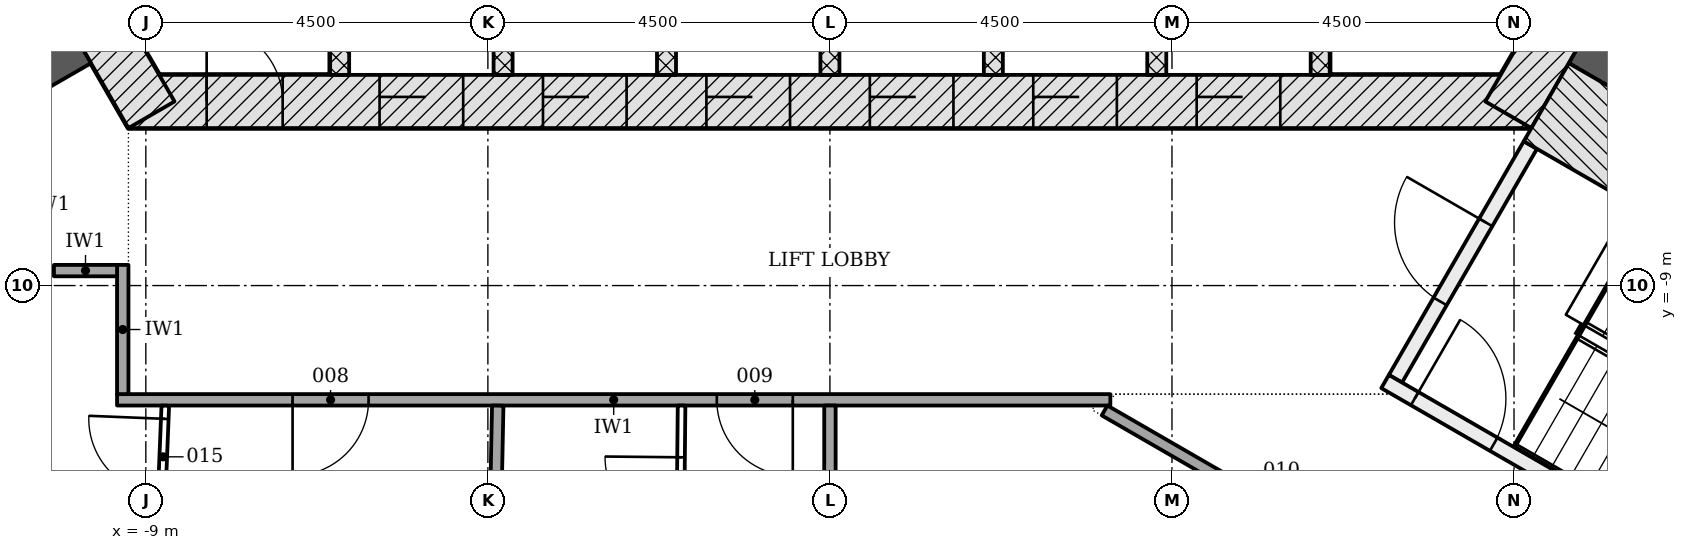
"""IFC4 building model, lengths in metres.
Left out: names, types, materials, properties, quantities, classifications, styles, units other than length and angle.
Written with IfcOpenShell. Run it as: python <this file> out.ifc"""

import sys

from ifc_helpers import new_model, si_unit, direction, frame, frame_2d, origin, place, context, subcontext, project, spatial, rectangle, extrude, element, fill, save


model = new_model("IFC4")
c1 = context("Model", 3, precision=1e-05, world=origin(), true_north=direction((0.0, 1.0)))
c2 = subcontext(c1, "Body", "Model", "MODEL_VIEW")
j1 = project(units=[si_unit("LENGTHUNIT", "METRE"), si_unit("PLANEANGLEUNIT", "RADIAN")], contexts=[c1])
p1 = place(None, origin())
s1 = spatial("IfcSite", under=j1, at=p1, CompositionType="ELEMENT")
p2 = place(p1, origin())
s2 = spatial("IfcBuilding", under=s1, at=p2, CompositionType="ELEMENT")
p3 = place(p2, frame((0.0, 0.0, 109.5)))
s3 = spatial("IfcBuildingStorey", under=s2, at=p3, CompositionType="ELEMENT", Elevation=109.5)
p4 = place(p3, frame((-9.229, -6.578, -0.2), z_axis=(0.0, 0.0, 1.0), x_axis=(1.0, 0.0, 0.0)))
e1 = element("IfcWall", 1, at=p4, inside=s3, PredefinedType="SHEAR", context=c2, shape_type="SweptSolid", body=[
    extrude(rectangle(XDim=18.458, YDim=0.7, at=frame_2d((9.229, 0.0))), origin(), (0.0, 0.0, 1.0), 3.6),
])
p5 = place(p4, frame((3.304, 0.0, 0.2)))
e2 = element("IfcOpeningElement", 2, at=p5, cuts=e1, PredefinedType="OPENING", context=c2, shape_type="SweptSolid", body=[
    extrude(rectangle(XDim=1.1, YDim=2.1, at=frame_2d((0.55, 1.05))), frame((0.0, 0.36, 0.0), z_axis=(0.0, -1.0, 0.0), x_axis=(1.0, 0.0, 0.0)), (0.0, 0.0, 1.0), 0.72),
])
p6 = place(p4, frame((5.454, 0.0, 0.2)))
e3 = element("IfcOpeningElement", 3, at=p6, cuts=e1, PredefinedType="OPENING", context=c2, shape_type="SweptSolid", body=[
    extrude(rectangle(XDim=1.1, YDim=2.1, at=frame_2d((0.55, 1.05))), frame((0.0, 0.36, 0.0), z_axis=(0.0, -1.0, 0.0), x_axis=(1.0, 0.0, 0.0)), (0.0, 0.0, 1.0), 0.72),
])
p7 = place(p4, frame((7.604, 0.0, 0.2)))
e4 = element("IfcOpeningElement", 4, at=p7, cuts=e1, PredefinedType="OPENING", context=c2, shape_type="SweptSolid", body=[
    extrude(rectangle(XDim=1.1, YDim=2.1, at=frame_2d((0.55, 1.05))), frame((0.0, 0.36, 0.0), z_axis=(0.0, -1.0, 0.0), x_axis=(1.0, 0.0, 0.0)), (0.0, 0.0, 1.0), 0.72),
])
p8 = place(p4, frame((9.754, 0.0, 0.2)))
e5 = element("IfcOpeningElement", 5, at=p8, cuts=e1, PredefinedType="OPENING", context=c2, shape_type="SweptSolid", body=[
    extrude(rectangle(XDim=1.1, YDim=2.1, at=frame_2d((0.55, 1.05))), frame((0.0, 0.36, 0.0), z_axis=(0.0, -1.0, 0.0), x_axis=(1.0, 0.0, 0.0)), (0.0, 0.0, 1.0), 0.72),
])
p9 = place(p4, frame((11.904, 0.0, 0.2)))
e6 = element("IfcOpeningElement", 6, at=p9, cuts=e1, PredefinedType="OPENING", context=c2, shape_type="SweptSolid", body=[
    extrude(rectangle(XDim=1.1, YDim=2.1, at=frame_2d((0.55, 1.05))), frame((0.0, 0.36, 0.0), z_axis=(0.0, -1.0, 0.0), x_axis=(1.0, 0.0, 0.0)), (0.0, 0.0, 1.0), 0.72),
])
p10 = place(p4, frame((14.054, 0.0, 0.2)))
e7 = element("IfcOpeningElement", 7, at=p10, cuts=e1, PredefinedType="OPENING", context=c2, shape_type="SweptSolid", body=[
    extrude(rectangle(XDim=1.1, YDim=2.1, at=frame_2d((0.55, 1.05))), frame((0.0, 0.36, 0.0), z_axis=(0.0, -1.0, 0.0), x_axis=(1.0, 0.0, 0.0)), (0.0, 0.0, 1.0), 0.72),
])
p11 = place(p4, frame((1.029, 0.0, 0.2)))
e8 = element("IfcOpeningElement", 8, at=p11, cuts=e1, PredefinedType="OPENING", context=c2, shape_type="SweptSolid", body=[
    extrude(rectangle(XDim=1.0, YDim=2.1, at=frame_2d((0.5, 1.05))), frame((0.0, 0.36, 0.0), z_axis=(0.0, -1.0, 0.0), x_axis=(1.0, 0.0, 0.0)), (0.0, 0.0, 1.0), 0.72),
])
for number, where, z_axis, x_axis in (
    (9, (8.926, -6.753, -0.2), (0.0, 0.0, 1.0), (0.5, 0.866, 0.0)),
    (10, (-10.311, -4.353, -0.2), (0.0, 0.0, 1.0), (0.5, -0.866, 0.0)),
):
    element("IfcWall", number, at=place(p3, frame(where, z_axis=z_axis, x_axis=x_axis)), inside=s3, PredefinedType="SHEAR", context=c2, shape_type="SweptSolid", body=[
        extrude(rectangle(XDim=2.771, YDim=0.7, at=frame_2d((1.386, 0.0))), origin(), (0.0, 0.0, 1.0), 3.6),
    ])
for number, where, z_axis, x_axis in (
    (11, (-9.922, -5.728, -0.2), (0.0, 0.0, 1.0), (-0.866, -0.5, 0.0)),
    (12, (9.922, -5.728, -0.2), (0.0, 0.0, 1.0), (0.866, -0.5, 0.0)),
):
    element("IfcWall", number, at=place(p3, frame(where, z_axis=z_axis, x_axis=x_axis)), inside=s3, PredefinedType="SHEAR", context=c2, shape_type="SweptSolid", body=[
        extrude(rectangle(XDim=11.918, YDim=0.8, at=frame_2d((5.959, 0.0))), origin(), (0.0, 0.0, 1.0), 3.6),
    ])
for number, where, z_axis, x_axis in (
    (13, (-6.45, -6.228, -0.2), (0.0, 0.0, 1.0), (0.0, 1.0, 0.0)),
    (14, (-4.3, -6.228, -0.2), (0.0, 0.0, 1.0), (0.0, 1.0, 0.0)),
    (15, (-2.15, -6.228, -0.2), (0.0, 0.0, 1.0), (0.0, 1.0, 0.0)),
    (16, (0.0, -6.228, -0.2), (0.0, 0.0, 1.0), (0.0, 1.0, 0.0)),
    (17, (2.15, -6.228, -0.2), (0.0, 0.0, 1.0), (0.0, 1.0, 0.0)),
    (18, (4.3, -6.228, -0.2), (0.0, 0.0, 1.0), (0.0, 1.0, 0.0)),
    (19, (6.45, -6.228, -0.2), (0.0, 0.0, 1.0), (0.0, 1.0, 0.0)),
):
    element("IfcWall", number, at=place(p3, frame(where, z_axis=z_axis, x_axis=x_axis)), inside=s3, PredefinedType="PARTITIONING", context=c2, shape_type="SweptSolid", body=[
        extrude(rectangle(XDim=2.5, YDim=0.25, at=frame_2d((1.25, 0.0))), origin(), (0.0, 0.0, 1.0), 3.6),
    ])
p12 = place(p3, frame((-10.418, -4.868, -0.2), z_axis=(0.0, 0.0, 1.0), x_axis=(-0.866018442252, -0.500012057535, 0.0)))
e20 = element("IfcWall", 20, at=p12, inside=s3, PredefinedType="SHEAR", context=c2, shape_type="SweptSolid", body=[
    extrude(rectangle(XDim=7.2, YDim=1.186, at=frame_2d((3.6, 0.0))), origin(), (0.0, 0.0, 1.0), 3.6),
])
p13 = place(p3, frame((7.44, -10.226, -0.2), z_axis=(0.0, 0.0, 1.0), x_axis=(0.500022077904, 0.866012656725, 0.0)))
e21 = element("IfcWall", 21, at=p13, inside=s3, PredefinedType="SHEAR", context=c2, shape_type="SweptSolid", body=[
    extrude(rectangle(XDim=3.55, YDim=0.2, at=frame_2d((1.775, 0.0))), origin(), (0.0, 0.0, 1.0), 3.6),
])
p14 = place(p13, frame((1.175, 0.0, 0.2)))
e22 = element("IfcOpeningElement", 22, at=p14, cuts=e21, PredefinedType="OPENING", context=c2, shape_type="SweptSolid", body=[
    extrude(rectangle(XDim=1.2, YDim=2.1, at=frame_2d((0.6, 1.05))), frame((0.0, 0.11, 0.0), z_axis=(0.0, -1.0, 0.0), x_axis=(1.0, 0.0, 0.0)), (0.0, 0.0, 1.0), 0.22),
])
p15 = place(p3, frame((7.304, -10.262, -0.2), z_axis=(0.0, 0.0, 1.0), x_axis=(0.866026594901, -0.49999793692, 0.0)))
e23 = element("IfcWall", 23, at=p15, inside=s3, PredefinedType="SHEAR", context=c2, shape_type="SweptSolid", body=[
    extrude(rectangle(XDim=5.6, YDim=0.2, at=frame_2d((2.8, 0.0))), origin(), (0.0, 0.0, 1.0), 3.6),
])
p16 = place(p15, frame((0.45, 0.0, 0.2)))
e24 = element("IfcOpeningElement", 24, at=p16, cuts=e23, PredefinedType="OPENING", context=c2, shape_type="SweptSolid", body=[
    extrude(rectangle(XDim=1.2, YDim=2.1, at=frame_2d((0.6, 1.05))), frame((0.0, 0.11, 0.0), z_axis=(0.0, -1.0, 0.0), x_axis=(1.0, 0.0, 0.0)), (0.0, 0.0, 1.0), 0.22),
])
p17 = place(p3, frame((9.425, -6.588, -0.2), z_axis=(0.0, 0.0, 1.0), x_axis=(0.866018442252, -0.500012057535, 0.0)))
e25 = element("IfcWall", 25, at=p17, inside=s3, PredefinedType="SHEAR", context=c2, shape_type="SweptSolid", body=[
    extrude(rectangle(XDim=7.2, YDim=1.186, at=frame_2d((3.6, 0.0))), origin(), (0.0, 0.0, 1.0), 3.6),
])
p18 = place(p3, frame((3.689, -10.503, 0.0), z_axis=(0.0, 0.0, 1.0), x_axis=(-1.0, 0.0, 0.0)))
e26 = element("IfcWall", 26, at=p18, inside=s3, PredefinedType="PARTITIONING", context=c2, shape_type="SweptSolid", body=[
    extrude(rectangle(XDim=13.068, YDim=0.15, at=frame_2d((6.534, 0.0))), origin(), (0.0, 0.0, 1.0), 2.847),
])
p19 = place(p18, frame((9.758, 0.0, 0.0)))
e27 = element("IfcOpeningElement", 27, at=p19, cuts=e26, PredefinedType="OPENING", context=c2, shape_type="SweptSolid", body=[
    extrude(rectangle(XDim=1.0, YDim=2.1, at=frame_2d((0.5, 1.05))), frame((0.0, 0.085, 0.0), z_axis=(0.0, -1.0, 0.0), x_axis=(1.0, 0.0, 0.0)), (0.0, 0.0, 1.0), 0.17),
])
p20 = place(p18, frame((4.177, 0.0, 0.0)))
e28 = element("IfcOpeningElement", 28, at=p20, cuts=e26, PredefinedType="OPENING", context=c2, shape_type="SweptSolid", body=[
    extrude(rectangle(XDim=1.0, YDim=2.1, at=frame_2d((0.5, 1.05))), frame((0.0, 0.085, 0.0), z_axis=(0.0, -1.0, 0.0), x_axis=(1.0, 0.0, 0.0)), (0.0, 0.0, 1.0), 0.17),
])
p21 = place(p3, frame((8.641, -13.546, 0.0), z_axis=(0.0, 0.0, 1.0), x_axis=(-0.866042728627, 0.499969991291, 0.0)))
e29 = element("IfcWall", 29, at=p21, inside=s3, PredefinedType="PARTITIONING", context=c2, shape_type="SweptSolid", body=[
    extrude(rectangle(XDim=5.805, YDim=0.15, at=frame_2d((2.903, 0.0))), origin(), (0.0, 0.0, 1.0), 2.847),
])
p22 = place(p21, frame((2.616, 0.0, 0.0)))
e30 = element("IfcOpeningElement", 30, at=p22, cuts=e29, PredefinedType="OPENING", context=c2, shape_type="SweptSolid", body=[
    extrude(rectangle(XDim=1.0, YDim=2.1, at=frame_2d((0.5, 1.05))), frame((0.0, 0.085, 0.0), z_axis=(0.0, -1.0, 0.0), x_axis=(1.0, 0.0, 0.0)), (0.0, 0.0, 1.0), 0.17),
])
p23 = place(p3, frame((-11.345, -7.012, 0.0), z_axis=(0.0, 0.0, 1.0), x_axis=(0.499998569178, -0.866026229868, 0.0)))
e31 = element("IfcWall", 31, at=p23, inside=s3, PredefinedType="PARTITIONING", context=c2, shape_type="SweptSolid", body=[
    extrude(rectangle(XDim=2.143, YDim=0.15, at=frame_2d((1.072, 0.0))), origin(), (0.0, 0.0, 1.0), 3.4),
])
p24 = place(p3, frame((-9.304, -10.428, 0.0), z_axis=(0.0, 0.0, 1.0), x_axis=(0.0, 1.0, 0.0)))
e32 = element("IfcWall", 32, at=p24, inside=s3, PredefinedType="PARTITIONING", context=c2, shape_type="SweptSolid", body=[
    extrude(rectangle(XDim=1.7, YDim=0.15, at=frame_2d((0.85, 0.0))), origin(), (0.0, 0.0, 1.0), 3.4),
])
p25 = place(p3, frame((-10.209, -8.803, 0.0), z_axis=(0.0, 0.0, 1.0), x_axis=(1.0, 0.0, 0.0)))
e33 = element("IfcWall", 33, at=p25, inside=s3, PredefinedType="PARTITIONING", context=c2, shape_type="SweptSolid", body=[
    extrude(rectangle(XDim=0.83, YDim=0.15, at=frame_2d((0.415, 0.0))), origin(), (0.0, 0.0, 1.0), 3.4),
])
p26 = place(p3, frame((0.0, -16.274, 0.0), z_axis=(0.0, 0.0, 1.0), x_axis=(0.0, 1.0, 0.0)))
e34 = element("IfcWall", 34, at=p26, inside=s3, PredefinedType="PARTITIONING", context=c2, shape_type="SweptSolid", body=[
    extrude(rectangle(XDim=5.696, YDim=0.15, at=frame_2d((2.848, 0.0))), origin(), (0.0, 0.0, 1.0), 2.847),
])
p27 = place(p3, frame((-4.484, -16.229, 0.0), z_axis=(0.0, 0.0, 1.0), x_axis=(0.020089281754, 0.999798190016, 0.0)))
e35 = element("IfcWall", 35, at=p27, inside=s3, PredefinedType="PARTITIONING", context=c2, shape_type="SweptSolid", body=[
    extrude(rectangle(XDim=5.651, YDim=0.15, at=frame_2d((2.826, 0.0))), origin(), (0.0, 0.0, 1.0), 2.847),
])
p28 = place(p3, frame((-8.966, -16.094, 0.0), z_axis=(0.0, 0.0, 1.0), x_axis=(0.040167671745, 0.999192953411, 0.0)))
e36 = element("IfcWall", 36, at=p28, inside=s3, PredefinedType="PARTITIONING", context=c2, shape_type="SweptSolid", body=[
    extrude(rectangle(XDim=5.519, YDim=0.1, at=frame_2d((2.759, 0.0))), origin(), (0.0, 0.0, 1.0), 2.847),
])
p29 = place(p28, frame((4.345, 0.0, 0.0)))
e37 = element("IfcOpeningElement", 37, at=p29, cuts=e36, PredefinedType="OPENING", context=c2, shape_type="SweptSolid", body=[
    extrude(rectangle(XDim=1.0, YDim=2.1, at=frame_2d((0.5, 1.05))), frame((0.0, 0.06, 0.0), z_axis=(0.0, -1.0, 0.0), x_axis=(1.0, 0.0, 0.0)), (0.0, 0.0, 1.0), 0.12),
])
p30 = place(p28, frame((1.634, 0.0, 0.0)))
e38 = element("IfcOpeningElement", 38, at=p30, cuts=e36, PredefinedType="OPENING", context=c2, shape_type="SweptSolid", body=[
    extrude(rectangle(XDim=1.0, YDim=2.1, at=frame_2d((0.5, 1.05))), frame((0.0, 0.06, 0.0), z_axis=(0.0, -1.0, 0.0), x_axis=(1.0, 0.0, 0.0)), (0.0, 0.0, 1.0), 0.12),
])
p31 = place(p3, frame((-1.976, -12.959, 0.0), z_axis=(0.0, 0.0, 1.0), x_axis=(0.009947205513, 0.999950525327, 0.0)))
e39 = element("IfcWall", 39, at=p31, inside=s3, PredefinedType="PARTITIONING", context=c2, shape_type="SweptSolid", body=[
    extrude(rectangle(XDim=2.381, YDim=0.1, at=frame_2d((1.19, 0.0))), origin(), (0.0, 0.0, 1.0), 3.4),
])
p32 = place(p31, frame((0.7, 0.0, 0.0)))
e40 = element("IfcOpeningElement", 40, at=p32, cuts=e39, PredefinedType="OPENING", context=c2, shape_type="SweptSolid", body=[
    extrude(rectangle(XDim=1.0, YDim=2.1, at=frame_2d((0.5, 1.05))), frame((0.0, 0.06, 0.0), z_axis=(0.0, -1.0, 0.0), x_axis=(1.0, 0.0, 0.0)), (0.0, 0.0, 1.0), 0.12),
])
p33 = place(p5, origin())
e41 = element("IfcDoor", 41, at=p33, inside=s3, OperationType="DOUBLE_DOOR_SLIDING", PredefinedType="DOOR", context=c2, shape_type="SweptSolid", body=[
    extrude(rectangle(XDim=1.1, YDim=2.1, at=frame_2d((0.55, 1.05))), frame((0.0, 0.025, 0.0), z_axis=(0.0, -1.0, 0.0), x_axis=(1.0, 0.0, 0.0)), (0.0, 0.0, 1.0), 0.05),
])
fill(e2, e41)
p34 = place(p6, origin())
e42 = element("IfcDoor", 42, at=p34, inside=s3, OperationType="DOUBLE_DOOR_SLIDING", PredefinedType="DOOR", context=c2, shape_type="SweptSolid", body=[
    extrude(rectangle(XDim=1.1, YDim=2.1, at=frame_2d((0.55, 1.05))), frame((0.0, 0.025, 0.0), z_axis=(0.0, -1.0, 0.0), x_axis=(1.0, 0.0, 0.0)), (0.0, 0.0, 1.0), 0.05),
])
fill(e3, e42)
p35 = place(p7, origin())
e43 = element("IfcDoor", 43, at=p35, inside=s3, OperationType="DOUBLE_DOOR_SLIDING", PredefinedType="DOOR", context=c2, shape_type="SweptSolid", body=[
    extrude(rectangle(XDim=1.1, YDim=2.1, at=frame_2d((0.55, 1.05))), frame((0.0, 0.025, 0.0), z_axis=(0.0, -1.0, 0.0), x_axis=(1.0, 0.0, 0.0)), (0.0, 0.0, 1.0), 0.05),
])
fill(e4, e43)
p36 = place(p8, origin())
e44 = element("IfcDoor", 44, at=p36, inside=s3, OperationType="DOUBLE_DOOR_SLIDING", PredefinedType="DOOR", context=c2, shape_type="SweptSolid", body=[
    extrude(rectangle(XDim=1.1, YDim=2.1, at=frame_2d((0.55, 1.05))), frame((0.0, 0.025, 0.0), z_axis=(0.0, -1.0, 0.0), x_axis=(1.0, 0.0, 0.0)), (0.0, 0.0, 1.0), 0.05),
])
fill(e5, e44)
p37 = place(p9, origin())
e45 = element("IfcDoor", 45, at=p37, inside=s3, OperationType="DOUBLE_DOOR_SLIDING", PredefinedType="DOOR", context=c2, shape_type="SweptSolid", body=[
    extrude(rectangle(XDim=1.1, YDim=2.1, at=frame_2d((0.55, 1.05))), frame((0.0, 0.025, 0.0), z_axis=(0.0, -1.0, 0.0), x_axis=(1.0, 0.0, 0.0)), (0.0, 0.0, 1.0), 0.05),
])
fill(e6, e45)
p38 = place(p10, origin())
e46 = element("IfcDoor", 46, at=p38, inside=s3, OperationType="DOUBLE_DOOR_SLIDING", PredefinedType="DOOR", context=c2, shape_type="SweptSolid", body=[
    extrude(rectangle(XDim=1.1, YDim=2.1, at=frame_2d((0.55, 1.05))), frame((0.0, 0.025, 0.0), z_axis=(0.0, -1.0, 0.0), x_axis=(1.0, 0.0, 0.0)), (0.0, 0.0, 1.0), 0.05),
])
fill(e7, e46)
p39 = place(p11, origin())
e47 = element("IfcDoor", 47, at=p39, inside=s3, OperationType="SINGLE_SWING_LEFT", PredefinedType="DOOR", context=c2, shape_type="SweptSolid", body=[
    extrude(rectangle(XDim=1.0, YDim=2.1, at=frame_2d((0.5, 1.05))), frame((0.0, 0.075, 0.0), z_axis=(0.0, -1.0, 0.0), x_axis=(1.0, 0.0, 0.0)), (0.0, 0.0, 1.0), 0.15),
])
fill(e8, e47)
p40 = place(p14, origin())
e48 = element("IfcDoor", 48, at=p40, inside=s3, OperationType="SINGLE_SWING_RIGHT", PredefinedType="DOOR", context=c2, shape_type="SweptSolid", body=[
    extrude(rectangle(XDim=1.2, YDim=2.1, at=frame_2d((0.6, 1.05))), frame((0.0, 0.025, 0.0), z_axis=(0.0, -1.0, 0.0), x_axis=(1.0, 0.0, 0.0)), (0.0, 0.0, 1.0), 0.05),
])
fill(e22, e48)
p41 = place(p16, origin())
e49 = element("IfcDoor", 49, at=p41, inside=s3, OperationType="SINGLE_SWING_LEFT", PredefinedType="DOOR", context=c2, shape_type="SweptSolid", body=[
    extrude(rectangle(XDim=1.2, YDim=2.1, at=frame_2d((0.6, 1.05))), frame((0.0, 0.025, 0.0), z_axis=(0.0, -1.0, 0.0), x_axis=(1.0, 0.0, 0.0)), (0.0, 0.0, 1.0), 0.05),
])
fill(e24, e49)
p42 = place(p19, origin())
e50 = element("IfcDoor", 50, at=p42, inside=s3, OperationType="SINGLE_SWING_RIGHT", PredefinedType="DOOR", context=c2, shape_type="SweptSolid", body=[
    extrude(rectangle(XDim=1.0, YDim=2.1, at=frame_2d((0.5, 1.05))), frame((0.0, 0.025, 0.0), z_axis=(0.0, -1.0, 0.0), x_axis=(1.0, 0.0, 0.0)), (0.0, 0.0, 1.0), 0.05),
])
fill(e27, e50)
p43 = place(p20, origin())
e51 = element("IfcDoor", 51, at=p43, inside=s3, OperationType="SINGLE_SWING_LEFT", PredefinedType="DOOR", context=c2, shape_type="SweptSolid", body=[
    extrude(rectangle(XDim=1.0, YDim=2.1, at=frame_2d((0.5, 1.05))), frame((0.0, 0.025, 0.0), z_axis=(0.0, -1.0, 0.0), x_axis=(1.0, 0.0, 0.0)), (0.0, 0.0, 1.0), 0.05),
])
fill(e28, e51)
p44 = place(p29, origin())
e52 = element("IfcDoor", 52, at=p44, inside=s3, OperationType="SINGLE_SWING_RIGHT", PredefinedType="DOOR", context=c2, shape_type="SweptSolid", body=[
    extrude(rectangle(XDim=1.0, YDim=2.1, at=frame_2d((0.5, 1.05))), frame((0.0, 0.025, 0.0), z_axis=(0.0, -1.0, 0.0), x_axis=(1.0, 0.0, 0.0)), (0.0, 0.0, 1.0), 0.05),
])
fill(e37, e52)
p45 = place(p32, origin())
e53 = element("IfcDoor", 53, at=p45, inside=s3, OperationType="SINGLE_SWING_RIGHT", PredefinedType="DOOR", context=c2, shape_type="SweptSolid", body=[
    extrude(rectangle(XDim=1.0, YDim=2.1, at=frame_2d((0.5, 1.05))), frame((0.0, 0.025, 0.0), z_axis=(0.0, -1.0, 0.0), x_axis=(1.0, 0.0, 0.0)), (0.0, 0.0, 1.0), 0.05),
])
fill(e40, e53)
save(model, sys.argv[1])
